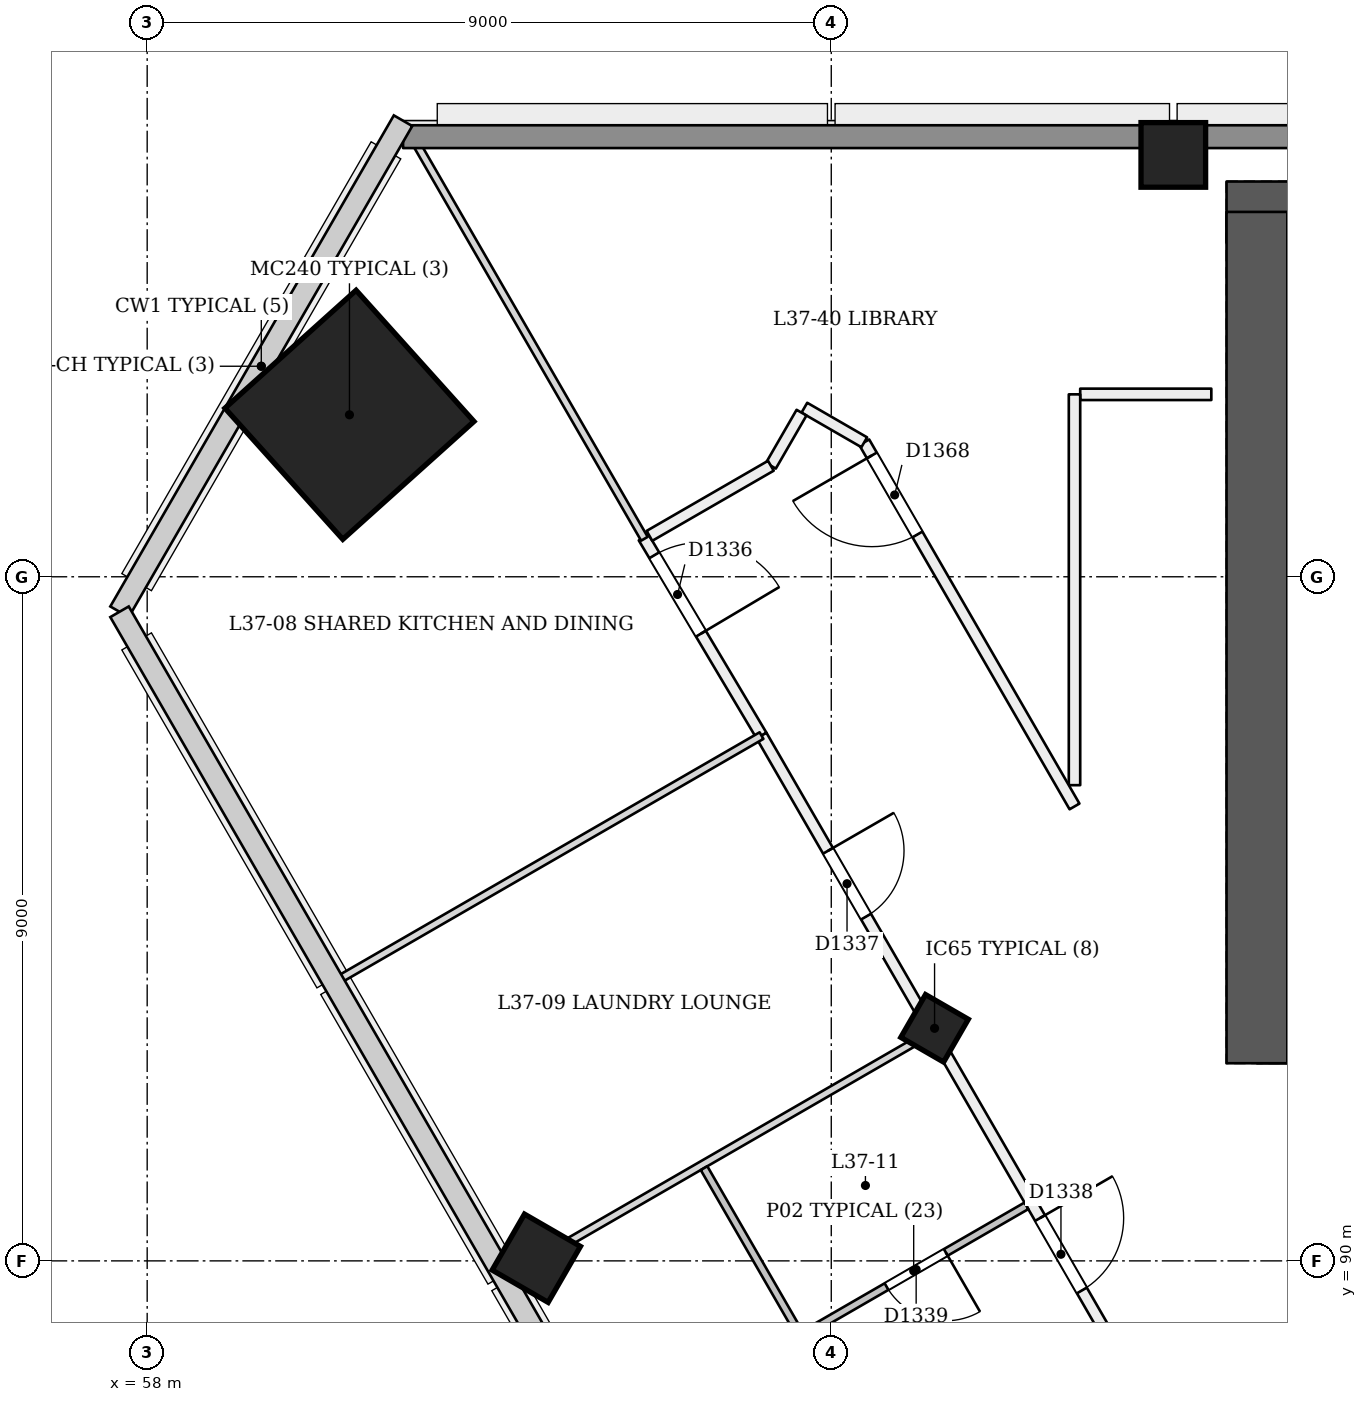
"""IFC4 building model, lengths in metres.
Left out: names, types, materials, properties, quantities, classifications, styles, units other than length and angle.
Written with IfcOpenShell. Run it as: python <this file> out.ifc"""

import sys

from ifc_helpers import new_model, si_unit, direction, frame, frame_2d, origin, origin_2d, place, context, subcontext, project, spatial, rectangle, extrude, element, fill, save


model = new_model("IFC4")
c1 = context("Model", 3, precision=1e-05, world=origin(), true_north=direction((0.0, 1.0)))
c2 = subcontext(c1, "Body", "Model", "MODEL_VIEW")
j1 = project(units=[si_unit("LENGTHUNIT", "METRE"), si_unit("PLANEANGLEUNIT", "RADIAN")], contexts=[c1])
p1 = place(None, origin())
s1 = spatial("IfcSite", under=j1, at=p1, CompositionType="ELEMENT")
p2 = place(p1, origin())
s2 = spatial("IfcBuilding", under=s1, at=p2, CompositionType="ELEMENT")
p3 = place(p2, frame((0.0, 0.0, 145.8)))
s3 = spatial("IfcBuildingStorey", under=s2, at=p3, CompositionType="ELEMENT", Elevation=145.8)
p4 = place(p3, frame((72.6, 93.0, 0.0), z_axis=(0.0, 0.0, 1.0), x_axis=(1.0, 0.0, 0.0)))
e1 = element("IfcWall", 1, at=p4, inside=s3, PredefinedType="SHEAR", context=c2, shape_type="SweptSolid", body=[
    extrude(rectangle(XDim=25.2, YDim=0.8, at=frame_2d((12.6, 0.0))), origin(), (0.0, 0.0, 1.0), 3.6),
])
p5 = place(p4, frame((1.2, 0.0, 0.0)))
e2 = element("IfcOpeningElement", 2, at=p5, cuts=e1, PredefinedType="OPENING", context=c2, shape_type="SweptSolid", body=[
    extrude(rectangle(XDim=1.2, YDim=2.1, at=frame_2d((0.6, 1.05))), frame((0.0, 0.411, 0.0), z_axis=(0.0, -1.0, 0.0), x_axis=(1.0, 0.0, 0.0)), (0.0, 0.0, 1.0), 0.821),
])
p6 = place(p4, frame((3.4, 0.0, 0.0)))
e3 = element("IfcOpeningElement", 3, at=p6, cuts=e1, PredefinedType="OPENING", context=c2, shape_type="SweptSolid", body=[
    extrude(rectangle(XDim=1.2, YDim=2.1, at=frame_2d((0.6, 1.05))), frame((0.0, 0.411, 0.0), z_axis=(0.0, -1.0, 0.0), x_axis=(1.0, 0.0, 0.0)), (0.0, 0.0, 1.0), 0.821),
])
p7 = place(p4, frame((13.4, 0.0, 0.0)))
e4 = element("IfcOpeningElement", 4, at=p7, cuts=e1, PredefinedType="OPENING", context=c2, shape_type="SweptSolid", body=[
    extrude(rectangle(XDim=1.2, YDim=2.1, at=frame_2d((0.6, 1.05))), frame((0.0, 0.411, 0.0), z_axis=(0.0, -1.0, 0.0), x_axis=(1.0, 0.0, 0.0)), (0.0, 0.0, 1.0), 0.821),
])
p8 = place(p4, frame((15.462, 0.0, 0.0)))
e5 = element("IfcOpeningElement", 5, at=p8, cuts=e1, PredefinedType="OPENING", context=c2, shape_type="SweptSolid", body=[
    extrude(rectangle(XDim=1.0, YDim=2.1, at=frame_2d((0.5, 1.05))), frame((0.0, 0.411, 0.0), z_axis=(0.0, -1.0, 0.0), x_axis=(1.0, 0.0, 0.0)), (0.0, 0.0, 1.0), 0.821),
])
p9 = place(p4, frame((17.7, 0.0, 0.0)))
e6 = element("IfcOpeningElement", 6, at=p9, cuts=e1, PredefinedType="OPENING", context=c2, shape_type="SweptSolid", body=[
    extrude(rectangle(XDim=1.0, YDim=2.1, at=frame_2d((0.5, 1.05))), frame((0.0, 0.411, 0.0), z_axis=(0.0, -1.0, 0.0), x_axis=(1.0, 0.0, 0.0)), (0.0, 0.0, 1.0), 0.821),
])
p10 = place(p4, frame((20.25, 0.0, 0.0)))
e7 = element("IfcOpeningElement", 7, at=p10, cuts=e1, PredefinedType="OPENING", context=c2, shape_type="SweptSolid", body=[
    extrude(rectangle(XDim=1.0, YDim=2.1, at=frame_2d((0.5, 1.05))), frame((0.0, 0.411, 0.0), z_axis=(0.0, -1.0, 0.0), x_axis=(1.0, 0.0, 0.0)), (0.0, 0.0, 1.0), 0.821),
])
p11 = place(p4, frame((22.738, 0.0, 0.0)))
e8 = element("IfcOpeningElement", 8, at=p11, cuts=e1, PredefinedType="OPENING", context=c2, shape_type="SweptSolid", body=[
    extrude(rectangle(XDim=1.0, YDim=2.1, at=frame_2d((0.5, 1.05))), frame((0.0, 0.411, 0.0), z_axis=(0.0, -1.0, 0.0), x_axis=(1.0, 0.0, 0.0)), (0.0, 0.0, 1.0), 0.821),
])
p12 = place(p3, frame((97.4, 103.8, 0.0), z_axis=(0.0, 0.0, 1.0), x_axis=(-1.0, 0.0, 0.0)))
e9 = element("IfcWall", 9, at=p12, inside=s3, PredefinedType="SHEAR", context=c2, shape_type="SweptSolid", body=[
    extrude(rectangle(XDim=25.2, YDim=0.8, at=frame_2d((12.6, 0.0))), origin(), (0.0, 0.0, 1.0), 3.6),
])
p13 = place(p3, frame((72.6, 103.8, 0.0), z_axis=(0.0, 0.0, 1.0), x_axis=(0.0, -1.0, 0.0)))
e10 = element("IfcWall", 10, at=p13, inside=s3, PredefinedType="SHEAR", context=c2, shape_type="SweptSolid", body=[
    extrude(rectangle(XDim=11.2, YDim=0.8, at=frame_2d((5.6, 0.0))), origin(), (0.0, 0.0, 1.0), 3.6),
])
p14 = place(p3, frame((68.332, 93.013, -0.02), z_axis=(0.022221406801, 0.038413224561, 0.999014831351), x_axis=(-0.866024047958, -0.498523147388, 0.038432016296)))
e11 = element("IfcColumn", 11, at=p14, inside=s3, PredefinedType="COLUMN", context=c2, shape_type="SweptSolid", body=[
    extrude(rectangle(XDim=0.65, YDim=0.65, at=origin_2d()), origin(), (0.0, 0.0, 1.0), 3.604),
])
p15 = place(p3, frame((60.627, 101.12, 0.0), z_axis=(0.028403721265, 0.009287135593, 0.999553389135), x_axis=(-0.866201877506, 0.49929479911, 0.019975259356)))
e12 = element("IfcColumn", 12, at=p15, inside=s3, PredefinedType="COLUMN", context=c2, shape_type="SweptSolid", body=[
    extrude(rectangle(XDim=2.32, YDim=2.32, at=origin_2d()), origin(), (0.0, 0.0, 1.0), 3.602),
])
p16 = place(p3, frame((71.5, 104.55, 0.0), z_axis=(0.0, 0.0, 1.0), x_axis=(1.0, 0.0, 0.0)))
e13 = element("IfcColumn", 13, at=p16, inside=s3, PredefinedType="COLUMN", context=c2, shape_type="SweptSolid", body=[
    extrude(rectangle(XDim=0.85, YDim=0.85, at=origin_2d()), origin(), (0.0, 0.0, 1.0), 3.6),
])
p17 = place(p3, frame((63.092, 89.987, -0.026), z_axis=(0.02222134892, 0.038480872521, 0.999012229206), x_axis=(-0.86564209005, -0.49918218391, 0.038482713007)))
e14 = element("IfcColumn", 14, at=p17, inside=s3, PredefinedType="COLUMN", context=c2, shape_type="SweptSolid", body=[
    extrude(rectangle(XDim=0.85, YDim=0.85, at=origin_2d()), origin(), (0.0, 0.0, 1.0), 3.604),
])
p18 = place(p3, frame((64.532, 99.517, 0.0), z_axis=(0.0, 0.0, 1.0), x_axis=(0.511189498573, -0.859468031138, 0.0)))
e15 = element("IfcWall", 15, at=p18, inside=s3, PredefinedType="PARTITIONING", context=c2, shape_type="SweptSolid", body=[
    extrude(rectangle(XDim=3.033, YDim=0.15, at=frame_2d((1.517, 0.0))), origin(), (0.0, 0.0, 1.0), 3.15),
])
p19 = place(p18, frame((0.273, 0.0, 0.0)))
e16 = element("IfcOpeningElement", 16, at=p19, cuts=e15, PredefinedType="OPENING", context=c2, shape_type="SweptSolid", body=[
    extrude(rectangle(XDim=1.2, YDim=2.1, at=frame_2d((0.6, 1.05))), frame((0.0, 0.085, 0.0), z_axis=(0.0, -1.0, 0.0), x_axis=(1.0, 0.0, 0.0)), (0.0, 0.0, 1.0), 0.171),
])
p20 = place(p3, frame((66.082, 96.91, 0.0), z_axis=(0.0, 0.0, 1.0), x_axis=(0.500001949747, -0.866024278094, 0.0)))
e17 = element("IfcWall", 17, at=p20, inside=s3, PredefinedType="PARTITIONING", context=c2, shape_type="SweptSolid", body=[
    extrude(rectangle(XDim=37.705, YDim=0.15, at=frame_2d((18.853, 0.0))), origin(), (0.0, 0.0, 1.0), 2.75),
])
p21 = place(p20, frame((1.75, 0.0, 0.0)))
e18 = element("IfcOpeningElement", 18, at=p21, cuts=e17, PredefinedType="OPENING", context=c2, shape_type="SweptSolid", body=[
    extrude(rectangle(XDim=1.0, YDim=2.1, at=frame_2d((0.5, 1.05))), frame((0.0, 0.085, 0.0), z_axis=(0.0, -1.0, 0.0), x_axis=(1.0, 0.0, 0.0)), (0.0, 0.0, 1.0), 0.171),
])
p22 = place(p20, frame((7.329, 0.0, 0.0)))
e19 = element("IfcOpeningElement", 19, at=p22, cuts=e17, PredefinedType="OPENING", context=c2, shape_type="SweptSolid", body=[
    extrude(rectangle(XDim=1.1, YDim=2.1, at=frame_2d((0.55, 1.05))), frame((0.0, 0.085, 0.0), z_axis=(0.0, -1.0, 0.0), x_axis=(1.0, 0.0, 0.0)), (0.0, 0.0, 1.0), 0.171),
])
p23 = place(p20, frame((9.72, 0.0, 0.0)))
e20 = element("IfcOpeningElement", 20, at=p23, cuts=e17, PredefinedType="OPENING", context=c2, shape_type="SweptSolid", body=[
    extrude(rectangle(XDim=1.0, YDim=2.1, at=frame_2d((0.5, 1.05))), frame((0.0, 0.085, 0.0), z_axis=(0.0, -1.0, 0.0), x_axis=(1.0, 0.0, 0.0)), (0.0, 0.0, 1.0), 0.171),
])
p24 = place(p20, frame((16.28, 0.0, 0.0)))
e21 = element("IfcOpeningElement", 21, at=p24, cuts=e17, PredefinedType="OPENING", context=c2, shape_type="SweptSolid", body=[
    extrude(rectangle(XDim=1.0, YDim=2.1, at=frame_2d((0.5, 1.05))), frame((0.0, 0.085, 0.0), z_axis=(0.0, -1.0, 0.0), x_axis=(1.0, 0.0, 0.0)), (0.0, 0.0, 1.0), 0.171),
])
p25 = place(p20, frame((18.72, 0.0, 0.0)))
e22 = element("IfcOpeningElement", 22, at=p25, cuts=e17, PredefinedType="OPENING", context=c2, shape_type="SweptSolid", body=[
    extrude(rectangle(XDim=1.0, YDim=2.1, at=frame_2d((0.5, 1.05))), frame((0.0, 0.085, 0.0), z_axis=(0.0, -1.0, 0.0), x_axis=(1.0, 0.0, 0.0)), (0.0, 0.0, 1.0), 0.171),
])
p26 = place(p20, frame((25.28, 0.0, 0.0)))
e23 = element("IfcOpeningElement", 23, at=p26, cuts=e17, PredefinedType="OPENING", context=c2, shape_type="SweptSolid", body=[
    extrude(rectangle(XDim=1.0, YDim=2.1, at=frame_2d((0.5, 1.05))), frame((0.0, 0.085, 0.0), z_axis=(0.0, -1.0, 0.0), x_axis=(1.0, 0.0, 0.0)), (0.0, 0.0, 1.0), 0.171),
])
p27 = place(p20, frame((27.72, 0.0, 0.0)))
e24 = element("IfcOpeningElement", 24, at=p27, cuts=e17, PredefinedType="OPENING", context=c2, shape_type="SweptSolid", body=[
    extrude(rectangle(XDim=1.0, YDim=2.1, at=frame_2d((0.5, 1.05))), frame((0.0, 0.085, 0.0), z_axis=(0.0, -1.0, 0.0), x_axis=(1.0, 0.0, 0.0)), (0.0, 0.0, 1.0), 0.171),
])
p28 = place(p20, frame((34.329, 0.0, 0.0)))
e25 = element("IfcOpeningElement", 25, at=p28, cuts=e17, PredefinedType="OPENING", context=c2, shape_type="SweptSolid", body=[
    extrude(rectangle(XDim=1.1, YDim=2.1, at=frame_2d((0.55, 1.05))), frame((0.0, 0.085, 0.0), z_axis=(0.0, -1.0, 0.0), x_axis=(1.0, 0.0, 0.0)), (0.0, 0.0, 1.0), 0.171),
])
p29 = place(p3, frame((72.0, 101.4, 0.0), z_axis=(0.0, 0.0, 1.0), x_axis=(-1.0, 0.0, 0.0)))
e26 = element("IfcWall", 26, at=p29, inside=s3, PredefinedType="PARTITIONING", context=c2, shape_type="SweptSolid", body=[
    extrude(rectangle(XDim=1.725, YDim=0.15, at=frame_2d((0.863, 0.0))), origin(), (0.0, 0.0, 1.0), 3.15),
])
p30 = place(p3, frame((70.2, 101.4, 0.0), z_axis=(0.0, 0.0, 1.0), x_axis=(0.0, -1.0, 0.0)))
e27 = element("IfcWall", 27, at=p30, inside=s3, PredefinedType="PARTITIONING", context=c2, shape_type="SweptSolid", body=[
    extrude(rectangle(XDim=5.142, YDim=0.15, at=frame_2d((2.571, 0.0))), origin(), (0.0, 0.0, 1.0), 3.15),
])
p31 = place(p3, frame((70.2, 95.979, 0.0), z_axis=(0.0, 0.0, 1.0), x_axis=(-0.500021702055, 0.866012873735, 0.0)))
e28 = element("IfcWall", 28, at=p31, inside=s3, PredefinedType="PARTITIONING", context=c2, shape_type="SweptSolid", body=[
    extrude(rectangle(XDim=5.532, YDim=0.15, at=frame_2d((2.766, 0.0))), origin(), (0.0, 0.0, 1.0), 3.15),
])
p32 = place(p31, frame((4.132, 0.0, 0.0)))
e29 = element("IfcOpeningElement", 29, at=p32, cuts=e28, PredefinedType="OPENING", context=c2, shape_type="SweptSolid", body=[
    extrude(rectangle(XDim=1.2, YDim=2.1, at=frame_2d((0.6, 1.05))), frame((0.0, 0.085, 0.0), z_axis=(0.0, -1.0, 0.0), x_axis=(1.0, 0.0, 0.0)), (0.0, 0.0, 1.0), 0.171),
])
p33 = place(p3, frame((67.434, 100.769, 0.0), z_axis=(0.0, 0.0, 1.0), x_axis=(-0.865970996668, 0.500094224052, 0.0)))
e30 = element("IfcWall", 30, at=p33, inside=s3, PredefinedType="PARTITIONING", context=c2, shape_type="SweptSolid", body=[
    extrude(rectangle(XDim=0.909, YDim=0.15, at=frame_2d((0.455, 0.0))), origin(), (0.0, 0.0, 1.0), 3.15),
])
p34 = place(p3, frame((66.609, 101.159, 0.0), z_axis=(0.0, 0.0, 1.0), x_axis=(-0.499914554297, -0.866074730264, 0.0)))
e31 = element("IfcWall", 31, at=p34, inside=s3, PredefinedType="PARTITIONING", context=c2, shape_type="SweptSolid", body=[
    extrude(rectangle(XDim=0.807, YDim=0.15, at=frame_2d((0.403, 0.0))), origin(), (0.0, 0.0, 1.0), 3.15),
])
p35 = place(p3, frame((66.205, 100.46, 0.0), z_axis=(0.0, 0.0, 1.0), x_axis=(-0.866035727774, -0.499982117899, 0.0)))
e32 = element("IfcWall", 32, at=p35, inside=s3, PredefinedType="PARTITIONING", context=c2, shape_type="SweptSolid", body=[
    extrude(rectangle(XDim=1.845, YDim=0.15, at=frame_2d((0.922, 0.0))), origin(), (0.0, 0.0, 1.0), 3.15),
])
p36 = place(p3, frame((60.522, 93.7, 0.0), z_axis=(0.0, 0.0, 1.0), x_axis=(0.866034872269, 0.499983599745, 0.0)))
e33 = element("IfcWall", 33, at=p36, inside=s3, PredefinedType="PARTITIONING", context=c2, shape_type="SweptSolid", body=[
    extrude(rectangle(XDim=6.42, YDim=0.1, at=frame_2d((3.21, 0.0))), origin(), (0.0, 0.0, 1.0), 2.65),
])
p37 = place(p3, frame((64.542, 99.5, 0.0), z_axis=(0.0, 0.0, 1.0), x_axis=(-0.500004896655, 0.866022576681, 0.0)))
e34 = element("IfcWall", 34, at=p37, inside=s3, PredefinedType="PARTITIONING", context=c2, shape_type="SweptSolid", body=[
    extrude(rectangle(XDim=6.235, YDim=0.1, at=frame_2d((3.118, 0.0))), origin(), (0.0, 0.0, 1.0), 2.65),
])
p38 = place(p3, frame((62.79, 89.813, 0.0), z_axis=(0.0, 0.0, 1.0), x_axis=(0.866032601554, 0.49998753289, 0.0)))
e35 = element("IfcWall", 35, at=p38, inside=s3, PredefinedType="PARTITIONING", context=c2, shape_type="SweptSolid", body=[
    extrude(rectangle(XDim=6.325, YDim=0.1, at=frame_2d((3.163, 0.0))), origin(), (0.0, 0.0, 1.0), 2.65),
])
p39 = place(p3, frame((69.567, 90.724, 0.0), z_axis=(0.0, 0.0, 1.0), x_axis=(-0.866032454348, -0.499987787867, 0.0)))
e36 = element("IfcWall", 36, at=p39, inside=s3, PredefinedType="PARTITIONING", context=c2, shape_type="SweptSolid", body=[
    extrude(rectangle(XDim=3.425, YDim=0.1, at=frame_2d((1.712, 0.0))), origin(), (0.0, 0.0, 1.0), 3.15),
])
p40 = place(p39, frame((1.225, 0.0, 0.0)))
e37 = element("IfcOpeningElement", 37, at=p40, cuts=e36, PredefinedType="OPENING", context=c2, shape_type="SweptSolid", body=[
    extrude(rectangle(XDim=0.9, YDim=2.1, at=frame_2d((0.45, 1.05))), frame((0.0, 0.061, 0.0), z_axis=(0.0, -1.0, 0.0), x_axis=(1.0, 0.0, 0.0)), (0.0, 0.0, 1.0), 0.121),
])
p41 = place(p3, frame((66.601, 89.012, 0.0), z_axis=(0.0, 0.0, 1.0), x_axis=(-0.500062241894, 0.865989465428, 0.0)))
e38 = element("IfcWall", 38, at=p41, inside=s3, PredefinedType="PARTITIONING", context=c2, shape_type="SweptSolid", body=[
    extrude(rectangle(XDim=2.55, YDim=0.1, at=frame_2d((1.275, 0.0))), origin(), (0.0, 0.0, 1.0), 2.75),
])
p42 = place(p3, frame((61.366, 104.79, 0.0), z_axis=(0.0, 0.0, 1.0), x_axis=(1.0, 0.0, 0.0)))
e39 = element("IfcWall", 39, at=p42, inside=s3, PredefinedType="SOLIDWALL", context=c2, shape_type="SweptSolid", body=[
    extrude(rectangle(XDim=47.268, YDim=0.3, at=frame_2d((23.634, 0.0))), origin(), (0.0, 0.0, 1.0), 2.65),
])
p43 = place(p19, origin())
e40 = element("IfcDoor", 40, at=p43, inside=s3, OperationType="SINGLE_SWING_RIGHT", PredefinedType="NOTDEFINED", context=c2, shape_type="SweptSolid", body=[
    extrude(rectangle(XDim=1.2, YDim=2.1, at=frame_2d((0.6, 1.05))), frame((0.0, 0.025, 0.0), z_axis=(0.0, -1.0, 0.0), x_axis=(1.0, 0.0, 0.0)), (0.0, 0.0, 1.0), 0.05),
])
fill(e16, e40)
p44 = place(p21, origin())
e41 = element("IfcDoor", 41, at=p44, inside=s3, OperationType="SINGLE_SWING_LEFT", PredefinedType="NOTDEFINED", context=c2, shape_type="SweptSolid", body=[
    extrude(rectangle(XDim=1.0, YDim=2.1, at=frame_2d((0.5, 1.05))), frame((0.0, 0.025, 0.0), z_axis=(0.0, -1.0, 0.0), x_axis=(1.0, 0.0, 0.0)), (0.0, 0.0, 1.0), 0.05),
])
fill(e18, e41)
p45 = place(p22, origin())
e42 = element("IfcDoor", 42, at=p45, inside=s3, OperationType="SINGLE_SWING_LEFT", PredefinedType="NOTDEFINED", context=c2, shape_type="SweptSolid", body=[
    extrude(rectangle(XDim=1.1, YDim=2.1, at=frame_2d((0.55, 1.05))), frame((0.0, 0.025, 0.0), z_axis=(0.0, -1.0, 0.0), x_axis=(1.0, 0.0, 0.0)), (0.0, 0.0, 1.0), 0.05),
])
fill(e19, e42)
p46 = place(p40, origin())
e43 = element("IfcDoor", 43, at=p46, inside=s3, OperationType="SINGLE_SWING_LEFT", PredefinedType="NOTDEFINED", context=c2, shape_type="SweptSolid", body=[
    extrude(rectangle(XDim=0.9, YDim=2.1, at=frame_2d((0.45, 1.05))), frame((0.0, 0.025, 0.0), z_axis=(0.0, -1.0, 0.0), x_axis=(1.0, 0.0, 0.0)), (0.0, 0.0, 1.0), 0.05),
])
fill(e37, e43)
p47 = place(p32, origin())
e44 = element("IfcDoor", 44, at=p47, inside=s3, OperationType="SINGLE_SWING_RIGHT", PredefinedType="NOTDEFINED", context=c2, shape_type="SweptSolid", body=[
    extrude(rectangle(XDim=1.2, YDim=2.1, at=frame_2d((0.6, 1.05))), frame((0.0, 0.025, 0.0), z_axis=(0.0, -1.0, 0.0), x_axis=(1.0, 0.0, 0.0)), (0.0, 0.0, 1.0), 0.05),
])
fill(e29, e44)
save(model, sys.argv[1])
